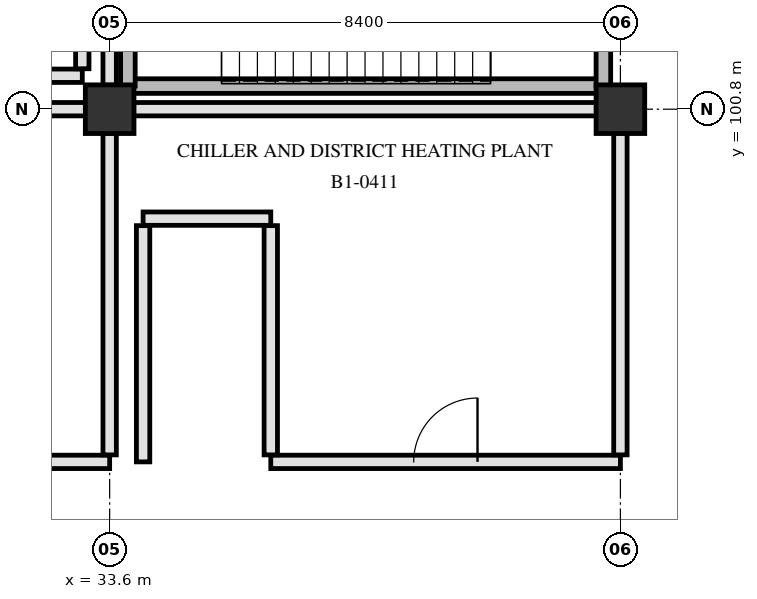
"""IFC4 building model, lengths in metres.
Left out: names, types, materials, properties, quantities, classifications, styles, units other than length and angle.
Written with IfcOpenShell. Run it as: python <this file> out.ifc"""

import sys

from ifc_helpers import new_model, si_unit, direction, frame, frame_2d, origin, origin_2d, place, context, subcontext, project, spatial, rectangle, extrude, element, fill, save


model = new_model("IFC4")
c1 = context("Model", 3, precision=1e-05, world=origin(), true_north=direction((0.0, 1.0)))
c2 = subcontext(c1, "Body", "Model", "MODEL_VIEW")
j1 = project(units=[si_unit("LENGTHUNIT", "METRE"), si_unit("PLANEANGLEUNIT", "RADIAN")], contexts=[c1])
p1 = place(None, origin())
s1 = spatial("IfcSite", under=j1, at=p1, CompositionType="ELEMENT")
p2 = place(p1, origin())
s2 = spatial("IfcBuilding", under=s1, at=p2, CompositionType="ELEMENT")
p3 = place(p2, frame((0.0, 0.0, -5.4)))
s3 = spatial("IfcBuildingStorey", under=s2, at=p3, CompositionType="ELEMENT", Elevation=-5.4)
for number, where, z_axis, x_axis in (
    (1, (33.6, 100.8, 0.0), (0.0, 0.0, 1.0), (1.0, 0.0, 0.0)),
    (2, (42.0, 100.8, 0.0), (0.0, 0.0, 1.0), (1.0, 0.0, 0.0)),
):
    element("IfcColumn", number, at=place(p3, frame(where, z_axis=z_axis, x_axis=x_axis)), inside=s3, PredefinedType="COLUMN", context=c2, shape_type="SweptSolid", body=[
        extrude(rectangle(XDim=0.8, YDim=0.8, at=origin_2d()), origin(), (0.0, 0.0, 1.0), 5.4),
    ])
p4 = place(p3, frame((33.9, 101.18, 0.0), z_axis=(0.0, 0.0, 1.0), x_axis=(1.0, 0.0, 0.0)))
e3 = element("IfcWall", 3, at=p4, inside=s3, PredefinedType="SHEAR", context=c2, shape_type="SweptSolid", body=[
    extrude(rectangle(XDim=7.82, YDim=0.24, at=frame_2d((3.91, 0.0))), origin(), (0.0, 0.0, 1.0), 5.08),
])
for number, where, z_axis, x_axis in (
    (4, (33.9, 101.18, 0.0), (0.0, 0.0, 1.0), (0.0, 1.0, 0.0)),
    (5, (41.72, 101.18, 0.0), (0.0, 0.0, 1.0), (0.0, 1.0, 0.0)),
):
    element("IfcWall", number, at=place(p3, frame(where, z_axis=z_axis, x_axis=x_axis)), inside=s3, PredefinedType="SHEAR", context=c2, shape_type="SweptSolid", body=[
        extrude(rectangle(XDim=3.32, YDim=0.24, at=frame_2d((1.66, 0.0))), origin(), (0.0, 0.0, 1.0), 5.08),
    ])
p5 = place(p3, frame((25.2, 95.0, 0.0), z_axis=(0.0, 0.0, 1.0), x_axis=(1.0, 0.0, 0.0)))
e6 = element("IfcWall", 6, at=p5, inside=s3, PredefinedType="PARTITIONING", context=c2, shape_type="SweptSolid", body=[
    extrude(rectangle(XDim=8.4, YDim=0.22, at=frame_2d((4.2, 0.0))), origin(), (0.0, 0.0, 1.0), 4.47),
])
p6 = place(p5, frame((3.74, 0.0, 0.0)))
e7 = element("IfcOpeningElement", 7, at=p6, cuts=e6, PredefinedType="OPENING", context=c2, shape_type="SweptSolid", body=[
    extrude(rectangle(XDim=0.92, YDim=2.08, at=frame_2d((0.46, 1.04))), frame((0.0, 0.12, 0.0), z_axis=(0.0, -1.0, 0.0), x_axis=(1.0, 0.0, 0.0)), (0.0, 0.0, 1.0), 0.24),
])
p7 = place(p3, frame((36.25, 95.0, 0.0), z_axis=(0.0, 0.0, 1.0), x_axis=(1.0, 0.0, 0.0)))
e8 = element("IfcWall", 8, at=p7, inside=s3, PredefinedType="PARTITIONING", context=c2, shape_type="SweptSolid", body=[
    extrude(rectangle(XDim=5.75, YDim=0.22, at=frame_2d((2.875, 0.0))), origin(), (0.0, 0.0, 1.0), 4.47),
])
p8 = place(p7, frame((2.35, 0.0, 0.0)))
e9 = element("IfcOpeningElement", 9, at=p8, cuts=e8, PredefinedType="OPENING", context=c2, shape_type="SweptSolid", body=[
    extrude(rectangle(XDim=1.05, YDim=2.15, at=frame_2d((0.525, 1.075))), frame((0.0, 0.12, 0.0), z_axis=(0.0, -1.0, 0.0), x_axis=(1.0, 0.0, 0.0)), (0.0, 0.0, 1.0), 0.24),
])
p9 = place(p3, frame((34.15, 99.0, 0.0), z_axis=(0.0, 0.0, 1.0), x_axis=(1.0, 0.0, 0.0)))
e10 = element("IfcWall", 10, at=p9, inside=s3, PredefinedType="PARTITIONING", context=c2, shape_type="SweptSolid", body=[
    extrude(rectangle(XDim=2.1, YDim=0.22, at=frame_2d((1.05, 0.0))), origin(), (0.0, 0.0, 1.0), 5.07),
])
p10 = place(p3, frame((25.595, 100.8, 0.0), z_axis=(0.0, 0.0, 1.0), x_axis=(1.0, 0.0, 0.0)))
e11 = element("IfcWall", 11, at=p10, inside=s3, PredefinedType="PARTITIONING", context=c2, shape_type="SweptSolid", body=[
    extrude(rectangle(XDim=7.61, YDim=0.22, at=frame_2d((3.805, 0.0))), origin(), (0.0, 0.0, 1.0), 4.42),
])
p11 = place(p3, frame((33.995, 100.8, 0.0), z_axis=(0.0, 0.0, 1.0), x_axis=(1.0, 0.0, 0.0)))
e12 = element("IfcWall", 12, at=p11, inside=s3, PredefinedType="PARTITIONING", context=c2, shape_type="SweptSolid", body=[
    extrude(rectangle(XDim=7.61, YDim=0.22, at=frame_2d((3.805, 0.0))), origin(), (0.0, 0.0, 1.0), 4.42),
])
p12 = place(p3, frame((31.15, 101.35, 0.0), z_axis=(0.0, 0.0, 1.0), x_axis=(1.0, 0.0, 0.0)))
e13 = element("IfcWall", 13, at=p12, inside=s3, PredefinedType="PARTITIONING", context=c2, shape_type="SweptSolid", body=[
    extrude(rectangle(XDim=2.0, YDim=0.22, at=frame_2d((1.0, 0.0))), origin(), (0.0, 0.0, 1.0), 5.07),
])
p13 = place(p3, frame((33.15, 101.465, 0.0), z_axis=(0.0, 0.0, 1.0), x_axis=(0.0, 1.0, 0.0)))
e14 = element("IfcWall", 14, at=p13, inside=s3, PredefinedType="PARTITIONING", context=c2, shape_type="SweptSolid", body=[
    extrude(rectangle(XDim=5.135, YDim=0.22, at=frame_2d((2.567, 0.0))), origin(), (0.0, 0.0, 1.0), 5.07),
])
p14 = place(p3, frame((33.6, 95.115, 0.0), z_axis=(0.0, 0.0, 1.0), x_axis=(0.0, 1.0, 0.0)))
e15 = element("IfcWall", 15, at=p14, inside=s3, PredefinedType="PARTITIONING", context=c2, shape_type="SweptSolid", body=[
    extrude(rectangle(XDim=5.29, YDim=0.22, at=frame_2d((2.645, 0.0))), origin(), (0.0, 0.0, 1.0), 4.47),
])
p15 = place(p3, frame((33.6, 101.195, 0.0), z_axis=(0.0, 0.0, 1.0), x_axis=(0.0, 1.0, 0.0)))
e16 = element("IfcWall", 16, at=p15, inside=s3, PredefinedType="PARTITIONING", context=c2, shape_type="SweptSolid", body=[
    extrude(rectangle(XDim=5.405, YDim=0.22, at=frame_2d((2.703, 0.0))), origin(), (0.0, 0.0, 1.0), 4.47),
])
p16 = place(p3, frame((34.15, 95.0, 0.0), z_axis=(0.0, 0.0, 1.0), x_axis=(0.0, 1.0, 0.0)))
e17 = element("IfcWall", 17, at=p16, inside=s3, PredefinedType="PARTITIONING", context=c2, shape_type="SweptSolid", body=[
    extrude(rectangle(XDim=3.885, YDim=0.22, at=frame_2d((1.942, 0.0))), origin(), (0.0, 0.0, 1.0), 5.07),
])
p17 = place(p3, frame((36.25, 95.115, 0.0), z_axis=(0.0, 0.0, 1.0), x_axis=(0.0, 1.0, 0.0)))
e18 = element("IfcWall", 18, at=p17, inside=s3, PredefinedType="PARTITIONING", context=c2, shape_type="SweptSolid", body=[
    extrude(rectangle(XDim=3.77, YDim=0.22, at=frame_2d((1.885, 0.0))), origin(), (0.0, 0.0, 1.0), 5.07),
])
p18 = place(p3, frame((42.0, 95.115, 0.0), z_axis=(0.0, 0.0, 1.0), x_axis=(0.0, 1.0, 0.0)))
e19 = element("IfcWall", 19, at=p18, inside=s3, PredefinedType="PARTITIONING", context=c2, shape_type="SweptSolid", body=[
    extrude(rectangle(XDim=5.29, YDim=0.22, at=frame_2d((2.645, 0.0))), origin(), (0.0, 0.0, 1.0), 4.47),
])
p19 = place(p8, origin())
e20 = element("IfcDoor", 20, at=p19, inside=s3, OperationType="SINGLE_SWING_RIGHT", PredefinedType="DOOR", context=c2, shape_type="SweptSolid", body=[
    extrude(rectangle(XDim=1.05, YDim=2.15, at=frame_2d((0.525, 1.075))), frame((0.0, 0.025, 0.0), z_axis=(0.0, -1.0, 0.0), x_axis=(1.0, 0.0, 0.0)), (0.0, 0.0, 1.0), 0.05),
])
fill(e9, e20)
save(model, sys.argv[1])
